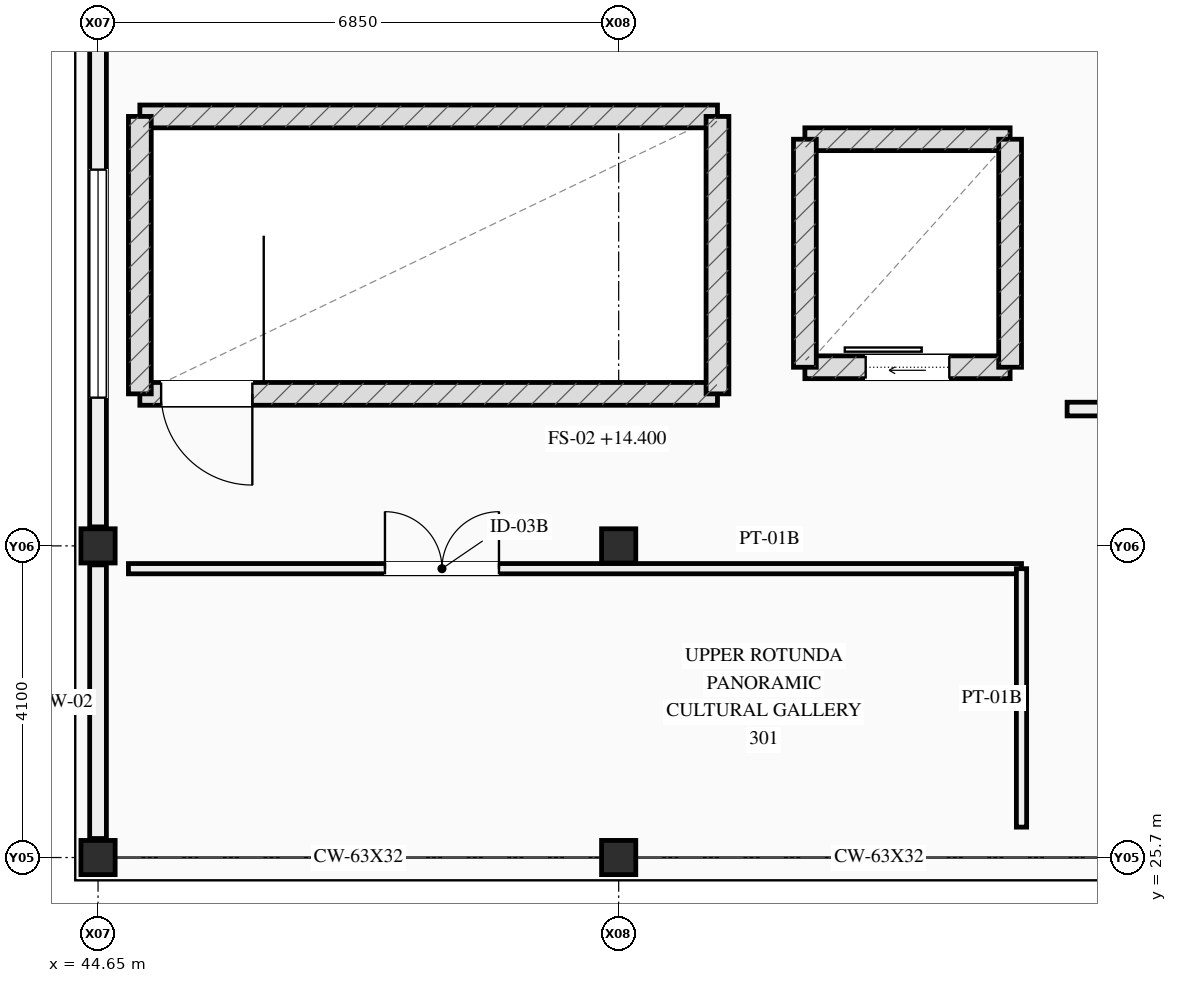
"""IFC4 building model, lengths in metres.
Left out: names, types, materials, properties, quantities, classifications, styles, units other than length and angle.
Written with IfcOpenShell. Run it as: python <this file> out.ifc"""

import sys

from ifc_helpers import new_model, si_unit, direction, frame, frame_2d, origin, origin_2d, place, context, subcontext, project, spatial, rectangle, extrude, element, fill, save


model = new_model("IFC4")
c1 = context("Model", 3, precision=1e-05, world=origin(), true_north=direction((0.0, 1.0)))
c2 = subcontext(c1, "Body", "Model", "MODEL_VIEW")
j1 = project(units=[si_unit("LENGTHUNIT", "METRE"), si_unit("PLANEANGLEUNIT", "RADIAN")], contexts=[c1])
p1 = place(None, origin())
s1 = spatial("IfcSite", under=j1, at=p1, CompositionType="ELEMENT")
p2 = place(p1, origin())
s2 = spatial("IfcBuilding", under=s1, at=p2, CompositionType="ELEMENT")
p3 = place(p2, frame((0.0, 0.0, 14.4)))
s3 = spatial("IfcBuildingStorey", under=s2, at=p3, CompositionType="ELEMENT", Elevation=14.4)
for number, where, z_axis, x_axis in (
    (1, (44.65, 25.7, 0.0), (0.0, 0.0, 1.0), (1.0, 0.0, 0.0)),
    (2, (44.65, 29.8, 0.0), (0.0, 0.0, 1.0), (1.0, 0.0, 0.0)),
    (3, (51.5, 25.7, 0.0), (0.0, 0.0, 1.0), (1.0, 0.0, 0.0)),
    (4, (51.5, 29.8, 0.0), (0.0, 0.0, 1.0), (1.0, 0.0, 0.0)),
):
    element("IfcColumn", number, at=place(p3, frame(where, z_axis=z_axis, x_axis=x_axis)), inside=s3, PredefinedType="COLUMN", context=c2, shape_type="SweptSolid", body=[
        extrude(rectangle(XDim=0.45, YDim=0.45, at=origin_2d()), origin(), (0.0, 0.0, 1.0), 4.2),
    ])
p4 = place(p3, frame((44.65, 25.95, 0.0), z_axis=(0.0, 0.0, 1.0), x_axis=(0.0, 1.0, 0.0)))
e5 = element("IfcWall", 5, at=p4, inside=s3, PredefinedType="STANDARD", context=c2, shape_type="SweptSolid", body=[
    extrude(rectangle(XDim=3.6, YDim=0.22, at=frame_2d((1.8, 0.0))), origin(), (0.0, 0.0, 1.0), 3.28),
])
p5 = place(p3, frame((44.65, 30.05, 0.0), z_axis=(0.0, 0.0, 1.0), x_axis=(0.0, 1.0, 0.0)))
e6 = element("IfcWall", 6, at=p5, inside=s3, PredefinedType="STANDARD", context=c2, shape_type="SweptSolid", body=[
    extrude(rectangle(XDim=6.4, YDim=0.22, at=frame_2d((3.2, 0.0))), origin(), (0.0, 0.0, 1.0), 3.28),
])
p6 = place(p5, frame((1.7, 0.0, 0.88)))
e7 = element("IfcOpeningElement", 7, at=p6, cuts=e6, PredefinedType="OPENING", context=c2, shape_type="SweptSolid", body=[
    extrude(rectangle(XDim=3.0, YDim=1.45, at=frame_2d((1.5, 0.725))), frame((0.0, 0.12, 0.0), z_axis=(0.0, -1.0, 0.0), x_axis=(1.0, 0.0, 0.0)), (0.0, 0.0, 1.0), 0.24),
])
p7 = place(p3, frame((45.2, 31.8, 0.0), z_axis=(0.0, 0.0, 1.0), x_axis=(1.0, 0.0, 0.0)))
e8 = element("IfcWall", 8, at=p7, inside=s3, PredefinedType="SHEAR", context=c2, shape_type="SweptSolid", body=[
    extrude(rectangle(XDim=7.6, YDim=0.3, at=frame_2d((3.8, 0.0))), origin(), (0.0, 0.0, 1.0), 3.99),
])
p8 = place(p7, frame((0.28, 0.0, 0.0)))
e9 = element("IfcOpeningElement", 9, at=p8, cuts=e8, PredefinedType="OPENING", context=c2, shape_type="SweptSolid", body=[
    extrude(rectangle(XDim=1.2, YDim=2.2, at=frame_2d((0.6, 1.1))), frame((0.0, 0.16, 0.0), z_axis=(0.0, -1.0, 0.0), x_axis=(1.0, 0.0, 0.0)), (0.0, 0.0, 1.0), 0.32),
])
p9 = place(p3, frame((52.8, 35.45, 0.0), z_axis=(0.0, 0.0, 1.0), x_axis=(-1.0, 0.0, 0.0)))
e10 = element("IfcWall", 10, at=p9, inside=s3, PredefinedType="SHEAR", context=c2, shape_type="SweptSolid", body=[
    extrude(rectangle(XDim=7.6, YDim=0.3, at=frame_2d((3.8, 0.0))), origin(), (0.0, 0.0, 1.0), 3.99),
])
for number, where, z_axis, x_axis in (
    (11, (45.2, 35.45, 0.0), (0.0, 0.0, 1.0), (0.0, -1.0, 0.0)),
    (12, (52.8, 31.8, 0.0), (0.0, 0.0, 1.0), (0.0, 1.0, 0.0)),
):
    element("IfcWall", number, at=place(p3, frame(where, z_axis=z_axis, x_axis=x_axis)), inside=s3, PredefinedType="SHEAR", context=c2, shape_type="SweptSolid", body=[
        extrude(rectangle(XDim=3.65, YDim=0.3, at=frame_2d((1.825, 0.0))), origin(), (0.0, 0.0, 1.0), 3.99),
    ])
p10 = place(p3, frame((53.95, 32.15, 0.0), z_axis=(0.0, 0.0, 1.0), x_axis=(1.0, 0.0, 0.0)))
e13 = element("IfcWall", 13, at=p10, inside=s3, PredefinedType="SHEAR", context=c2, shape_type="SweptSolid", body=[
    extrude(rectangle(XDim=2.7, YDim=0.3, at=frame_2d((1.35, 0.0))), origin(), (0.0, 0.0, 1.0), 4.005),
])
p11 = place(p10, frame((0.8, 0.0, 0.0)))
e14 = element("IfcOpeningElement", 14, at=p11, cuts=e13, PredefinedType="OPENING", context=c2, shape_type="SweptSolid", body=[
    extrude(rectangle(XDim=1.1, YDim=2.2, at=frame_2d((0.55, 1.1))), frame((0.0, 0.16, 0.0), z_axis=(0.0, -1.0, 0.0), x_axis=(1.0, 0.0, 0.0)), (0.0, 0.0, 1.0), 0.32),
])
p12 = place(p3, frame((53.95, 35.15, 0.0), z_axis=(0.0, 0.0, 1.0), x_axis=(1.0, 0.0, 0.0)))
e15 = element("IfcWall", 15, at=p12, inside=s3, PredefinedType="SHEAR", context=c2, shape_type="SweptSolid", body=[
    extrude(rectangle(XDim=2.7, YDim=0.3, at=frame_2d((1.35, 0.0))), origin(), (0.0, 0.0, 1.0), 4.005),
])
for number, where, z_axis, x_axis in (
    (16, (53.95, 32.15, 0.0), (0.0, 0.0, 1.0), (0.0, 1.0, 0.0)),
    (17, (56.65, 32.15, 0.0), (0.0, 0.0, 1.0), (0.0, 1.0, 0.0)),
):
    element("IfcWall", number, at=place(p3, frame(where, z_axis=z_axis, x_axis=x_axis)), inside=s3, PredefinedType="SHEAR", context=c2, shape_type="SweptSolid", body=[
        extrude(rectangle(XDim=3.0, YDim=0.3, at=frame_2d((1.5, 0.0))), origin(), (0.0, 0.0, 1.0), 4.005),
    ])
p13 = place(p3, frame((45.05, 29.5, 0.0), z_axis=(0.0, 0.0, 1.0), x_axis=(1.0, 0.0, 0.0)))
e18 = element("IfcWall", 18, at=p13, inside=s3, PredefinedType="PARTITIONING", context=c2, shape_type="SweptSolid", body=[
    extrude(rectangle(XDim=11.75, YDim=0.135, at=frame_2d((5.875, 0.0))), origin(), (0.0, 0.0, 1.0), 3.05),
])
p14 = place(p13, frame((3.375, 0.0, 0.0)))
e19 = element("IfcOpeningElement", 19, at=p14, cuts=e18, PredefinedType="OPENING", context=c2, shape_type="SweptSolid", body=[
    extrude(rectangle(XDim=1.5, YDim=2.2, at=frame_2d((0.75, 1.1))), frame((0.0, 0.077, 0.0), z_axis=(0.0, -1.0, 0.0), x_axis=(1.0, 0.0, 0.0)), (0.0, 0.0, 1.0), 0.155),
])
p15 = place(p3, frame((56.8, 26.1, 0.0), z_axis=(0.0, 0.0, 1.0), x_axis=(0.0, 1.0, 0.0)))
e20 = element("IfcWall", 20, at=p15, inside=s3, PredefinedType="PARTITIONING", context=c2, shape_type="SweptSolid", body=[
    extrude(rectangle(XDim=3.4, YDim=0.135, at=frame_2d((1.7, 0.0))), origin(), (0.0, 0.0, 1.0), 3.05),
])
p16 = place(p3, frame((57.4, 31.6, 0.0), z_axis=(0.0, 0.0, 1.0), x_axis=(1.0, 0.0, 0.0)))
e21 = element("IfcWall", 21, at=p16, inside=s3, PredefinedType="PLUMBINGWALL", context=c2, shape_type="SweptSolid", body=[
    extrude(rectangle(XDim=4.6, YDim=0.18, at=frame_2d((2.3, 0.0))), origin(), (0.0, 0.0, 1.0), 3.05),
])
p17 = place(p16, frame((3.24, 0.0, 0.0)))
e22 = element("IfcOpeningElement", 22, at=p17, cuts=e21, PredefinedType="OPENING", context=c2, shape_type="SweptSolid", body=[
    extrude(rectangle(XDim=0.92, YDim=2.1, at=frame_2d((0.46, 1.05))), frame((0.0, 0.1, 0.0), z_axis=(0.0, -1.0, 0.0), x_axis=(1.0, 0.0, 0.0)), (0.0, 0.0, 1.0), 0.2),
])
p18 = place(p6, origin())
e23 = element("IfcWindow", 23, at=p18, inside=s3, PartitioningType="SINGLE_PANEL", PredefinedType="WINDOW", context=c2, shape_type="SweptSolid", body=[
    extrude(rectangle(XDim=3.0, YDim=1.45, at=frame_2d((1.5, 0.725))), frame((0.0, 0.03, 0.0), z_axis=(0.0, -1.0, 0.0), x_axis=(1.0, 0.0, 0.0)), (0.0, 0.0, 1.0), 0.06),
])
fill(e7, e23)
p19 = place(p8, origin())
e24 = element("IfcDoor", 24, at=p19, inside=s3, OperationType="SINGLE_SWING_RIGHT", PredefinedType="DOOR", context=c2, shape_type="SweptSolid", body=[
    extrude(rectangle(XDim=1.2, YDim=2.2, at=frame_2d((0.6, 1.1))), frame((0.0, 0.025, 0.0), z_axis=(0.0, -1.0, 0.0), x_axis=(1.0, 0.0, 0.0)), (0.0, 0.0, 1.0), 0.05),
])
fill(e9, e24)
p20 = place(p11, origin())
e25 = element("IfcDoor", 25, at=p20, inside=s3, OperationType="SLIDING_TO_LEFT", PredefinedType="DOOR", context=c2, shape_type="SweptSolid", body=[
    extrude(rectangle(XDim=1.1, YDim=2.2, at=frame_2d((0.55, 1.1))), frame((0.0, 0.025, 0.0), z_axis=(0.0, -1.0, 0.0), x_axis=(1.0, 0.0, 0.0)), (0.0, 0.0, 1.0), 0.05),
])
fill(e14, e25)
p21 = place(p14, origin())
e26 = element("IfcDoor", 26, at=p21, inside=s3, OperationType="DOUBLE_DOOR_SINGLE_SWING", PredefinedType="DOOR", context=c2, shape_type="SweptSolid", body=[
    extrude(rectangle(XDim=1.5, YDim=2.2, at=frame_2d((0.75, 1.1))), frame((0.0, 0.025, 0.0), z_axis=(0.0, -1.0, 0.0), x_axis=(1.0, 0.0, 0.0)), (0.0, 0.0, 1.0), 0.05),
])
fill(e19, e26)
save(model, sys.argv[1])
